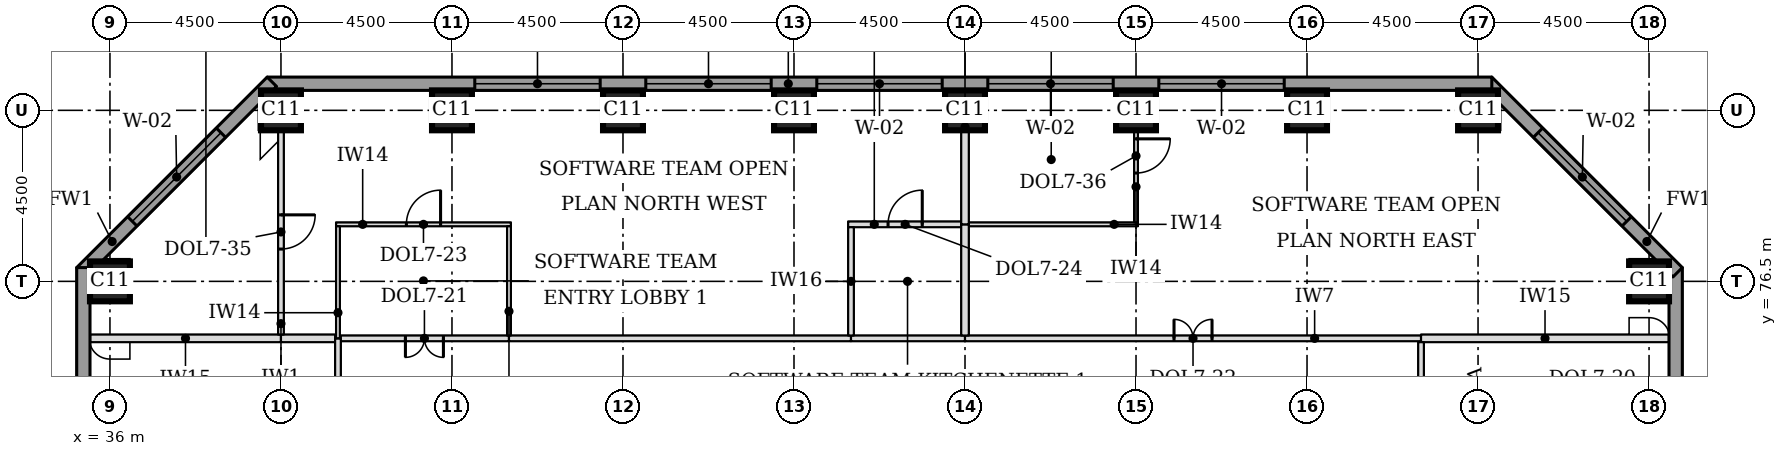
"""IFC4 building model, lengths in metres.
Left out: names, types, materials, properties, quantities, classifications, styles, units other than length and angle.
Written with IfcOpenShell. Run it as: python <this file> out.ifc"""

import sys

from ifc_helpers import new_model, si_unit, direction, frame, frame_2d, origin, origin_2d, place, context, subcontext, project, spatial, rectangle, extrude, element, fill, save


model = new_model("IFC4")
c1 = context("Model", 3, precision=1e-05, world=origin(), true_north=direction((0.0, 1.0)))
c2 = subcontext(c1, "Body", "Model", "MODEL_VIEW")
j1 = project(units=[si_unit("LENGTHUNIT", "METRE"), si_unit("PLANEANGLEUNIT", "RADIAN")], contexts=[c1])
p1 = place(None, origin())
s1 = spatial("IfcSite", under=j1, at=p1, CompositionType="ELEMENT")
p2 = place(p1, origin())
s2 = spatial("IfcBuilding", under=s1, at=p2, CompositionType="ELEMENT")
p3 = place(p2, frame((0.0, 0.0, 130.7)))
s3 = spatial("IfcBuildingStorey", under=s2, at=p3, CompositionType="ELEMENT", Elevation=130.7)
for number, where, z_axis, x_axis in (
    (1, (36.0, 76.5, 0.0), (0.0, 0.0, 1.0), (1.0, 0.0, 0.0)),
    (2, (76.5, 76.5, 0.0), (0.0, 0.0, 1.0), (1.0, 0.0, 0.0)),
    (3, (40.5, 81.0, 0.0), (0.0, 0.0, 1.0), (1.0, 0.0, 0.0)),
    (4, (45.0, 81.0, 0.0), (0.0, 0.0, 1.0), (1.0, 0.0, 0.0)),
    (5, (49.5, 81.0, 0.0), (0.0, 0.0, 1.0), (1.0, 0.0, 0.0)),
    (6, (54.0, 81.0, 0.0), (0.0, 0.0, 1.0), (1.0, 0.0, 0.0)),
    (7, (58.5, 81.0, 0.0), (0.0, 0.0, 1.0), (1.0, 0.0, 0.0)),
    (8, (63.0, 81.0, 0.0), (0.0, 0.0, 1.0), (1.0, 0.0, 0.0)),
    (9, (67.5, 81.0, 0.0), (0.0, 0.0, 1.0), (1.0, 0.0, 0.0)),
    (10, (72.0, 81.0, 0.0), (0.0, 0.0, 1.0), (1.0, 0.0, 0.0)),
):
    element("IfcColumn", number, at=place(p3, frame(where, z_axis=z_axis, x_axis=x_axis)), inside=s3, PredefinedType="COLUMN", context=c2, shape_type="SweptSolid", body=[
        extrude(rectangle(XDim=1.05, YDim=1.05, at=origin_2d()), origin(), (0.0, 0.0, 1.0), 3.7),
    ])
p4 = place(p3, frame((77.2, 44.638, 0.0), z_axis=(0.0, 0.0, 1.0), x_axis=(0.0, 1.0, 0.0)))
e11 = element("IfcWall", 11, at=p4, inside=s3, PredefinedType="STANDARD", context=c2, shape_type="SweptSolid", body=[
    extrude(rectangle(XDim=32.225, YDim=0.35, at=frame_2d((16.112, 0.0))), origin(), (0.0, 0.0, 1.0), 3.525),
])
p5 = place(p4, frame((5.462, 0.0, 0.9)))
e12 = element("IfcOpeningElement", 12, at=p5, cuts=e11, PredefinedType="OPENING", context=c2, shape_type="SweptSolid", body=[
    extrude(rectangle(XDim=3.3, YDim=1.9, at=frame_2d((1.65, 0.95))), frame((0.0, 0.185, 0.0), z_axis=(0.0, -1.0, 0.0), x_axis=(1.0, 0.0, 0.0)), (0.0, 0.0, 1.0), 0.37),
])
p6 = place(p4, frame((9.962, 0.0, 0.9)))
e13 = element("IfcOpeningElement", 13, at=p6, cuts=e11, PredefinedType="OPENING", context=c2, shape_type="SweptSolid", body=[
    extrude(rectangle(XDim=3.3, YDim=1.9, at=frame_2d((1.65, 0.95))), frame((0.0, 0.185, 0.0), z_axis=(0.0, -1.0, 0.0), x_axis=(1.0, 0.0, 0.0)), (0.0, 0.0, 1.0), 0.37),
])
p7 = place(p4, frame((14.462, 0.0, 0.9)))
e14 = element("IfcOpeningElement", 14, at=p7, cuts=e11, PredefinedType="OPENING", context=c2, shape_type="SweptSolid", body=[
    extrude(rectangle(XDim=3.3, YDim=1.9, at=frame_2d((1.65, 0.95))), frame((0.0, 0.185, 0.0), z_axis=(0.0, -1.0, 0.0), x_axis=(1.0, 0.0, 0.0)), (0.0, 0.0, 1.0), 0.37),
])
p8 = place(p4, frame((18.962, 0.0, 0.9)))
e15 = element("IfcOpeningElement", 15, at=p8, cuts=e11, PredefinedType="OPENING", context=c2, shape_type="SweptSolid", body=[
    extrude(rectangle(XDim=3.3, YDim=1.9, at=frame_2d((1.65, 0.95))), frame((0.0, 0.185, 0.0), z_axis=(0.0, -1.0, 0.0), x_axis=(1.0, 0.0, 0.0)), (0.0, 0.0, 1.0), 0.37),
])
p9 = place(p4, frame((23.462, 0.0, 0.9)))
e16 = element("IfcOpeningElement", 16, at=p9, cuts=e11, PredefinedType="OPENING", context=c2, shape_type="SweptSolid", body=[
    extrude(rectangle(XDim=3.3, YDim=1.9, at=frame_2d((1.65, 0.95))), frame((0.0, 0.185, 0.0), z_axis=(0.0, -1.0, 0.0), x_axis=(1.0, 0.0, 0.0)), (0.0, 0.0, 1.0), 0.37),
])
p10 = place(p3, frame((77.251, 76.739, 0.0), z_axis=(0.0, 0.0, 1.0), x_axis=(-0.707106781187, 0.707106781187, 0.0)))
e17 = element("IfcWall", 17, at=p10, inside=s3, PredefinedType="STANDARD", context=c2, shape_type="SweptSolid", body=[
    extrude(rectangle(XDim=7.089, YDim=0.35, at=frame_2d((3.544, 0.0))), origin(), (0.0, 0.0, 1.0), 3.525),
])
p11 = place(p10, frame((1.894, 0.0, 0.9)))
e18 = element("IfcOpeningElement", 18, at=p11, cuts=e17, PredefinedType="OPENING", context=c2, shape_type="SweptSolid", body=[
    extrude(rectangle(XDim=3.3, YDim=1.9, at=frame_2d((1.65, 0.95))), frame((0.0, 0.185, 0.0), z_axis=(0.0, -1.0, 0.0), x_axis=(1.0, 0.0, 0.0)), (0.0, 0.0, 1.0), 0.37),
])
p12 = place(p3, frame((72.362, 81.7, 0.0), z_axis=(0.0, 0.0, 1.0), x_axis=(-1.0, 0.0, 0.0)))
e19 = element("IfcWall", 19, at=p12, inside=s3, PredefinedType="STANDARD", context=c2, shape_type="SweptSolid", body=[
    extrude(rectangle(XDim=32.225, YDim=0.35, at=frame_2d((16.112, 0.0))), origin(), (0.0, 0.0, 1.0), 3.525),
])
p13 = place(p12, frame((5.462, 0.0, 0.9)))
e20 = element("IfcOpeningElement", 20, at=p13, cuts=e19, PredefinedType="OPENING", context=c2, shape_type="SweptSolid", body=[
    extrude(rectangle(XDim=3.3, YDim=1.9, at=frame_2d((1.65, 0.95))), frame((0.0, 0.185, 0.0), z_axis=(0.0, -1.0, 0.0), x_axis=(1.0, 0.0, 0.0)), (0.0, 0.0, 1.0), 0.37),
])
p14 = place(p12, frame((9.962, 0.0, 0.9)))
e21 = element("IfcOpeningElement", 21, at=p14, cuts=e19, PredefinedType="OPENING", context=c2, shape_type="SweptSolid", body=[
    extrude(rectangle(XDim=3.3, YDim=1.9, at=frame_2d((1.65, 0.95))), frame((0.0, 0.185, 0.0), z_axis=(0.0, -1.0, 0.0), x_axis=(1.0, 0.0, 0.0)), (0.0, 0.0, 1.0), 0.37),
])
p15 = place(p12, frame((14.462, 0.0, 0.9)))
e22 = element("IfcOpeningElement", 22, at=p15, cuts=e19, PredefinedType="OPENING", context=c2, shape_type="SweptSolid", body=[
    extrude(rectangle(XDim=3.3, YDim=1.9, at=frame_2d((1.65, 0.95))), frame((0.0, 0.185, 0.0), z_axis=(0.0, -1.0, 0.0), x_axis=(1.0, 0.0, 0.0)), (0.0, 0.0, 1.0), 0.37),
])
p16 = place(p12, frame((18.962, 0.0, 0.9)))
e23 = element("IfcOpeningElement", 23, at=p16, cuts=e19, PredefinedType="OPENING", context=c2, shape_type="SweptSolid", body=[
    extrude(rectangle(XDim=3.3, YDim=1.9, at=frame_2d((1.65, 0.95))), frame((0.0, 0.185, 0.0), z_axis=(0.0, -1.0, 0.0), x_axis=(1.0, 0.0, 0.0)), (0.0, 0.0, 1.0), 0.37),
])
p17 = place(p12, frame((23.462, 0.0, 0.9)))
e24 = element("IfcOpeningElement", 24, at=p17, cuts=e19, PredefinedType="OPENING", context=c2, shape_type="SweptSolid", body=[
    extrude(rectangle(XDim=3.3, YDim=1.9, at=frame_2d((1.65, 0.95))), frame((0.0, 0.185, 0.0), z_axis=(0.0, -1.0, 0.0), x_axis=(1.0, 0.0, 0.0)), (0.0, 0.0, 1.0), 0.37),
])
p18 = place(p3, frame((40.261, 81.751, 0.0), z_axis=(0.0, 0.0, 1.0), x_axis=(-0.707106781187, -0.707106781187, 0.0)))
e25 = element("IfcWall", 25, at=p18, inside=s3, PredefinedType="STANDARD", context=c2, shape_type="SweptSolid", body=[
    extrude(rectangle(XDim=7.089, YDim=0.35, at=frame_2d((3.544, 0.0))), origin(), (0.0, 0.0, 1.0), 3.525),
])
p19 = place(p18, frame((1.894, 0.0, 0.9)))
e26 = element("IfcOpeningElement", 26, at=p19, cuts=e25, PredefinedType="OPENING", context=c2, shape_type="SweptSolid", body=[
    extrude(rectangle(XDim=3.3, YDim=1.9, at=frame_2d((1.65, 0.95))), frame((0.0, 0.185, 0.0), z_axis=(0.0, -1.0, 0.0), x_axis=(1.0, 0.0, 0.0)), (0.0, 0.0, 1.0), 0.37),
])
p20 = place(p3, frame((35.3, 76.862, 0.0), z_axis=(0.0, 0.0, 1.0), x_axis=(0.0, -1.0, 0.0)))
e27 = element("IfcWall", 27, at=p20, inside=s3, PredefinedType="STANDARD", context=c2, shape_type="SweptSolid", body=[
    extrude(rectangle(XDim=13.337, YDim=0.35, at=frame_2d((6.669, 0.0))), origin(), (0.0, 0.0, 1.0), 3.525),
])
p21 = place(p20, frame((9.537, 0.0, 0.9)))
e28 = element("IfcOpeningElement", 28, at=p21, cuts=e27, PredefinedType="OPENING", context=c2, shape_type="SweptSolid", body=[
    extrude(rectangle(XDim=3.3, YDim=1.9, at=frame_2d((1.65, 0.95))), frame((0.0, 0.185, 0.0), z_axis=(0.0, -1.0, 0.0), x_axis=(1.0, 0.0, 0.0)), (0.0, 0.0, 1.0), 0.37),
])
p22 = place(p3, frame((35.475, 75.0, 0.0), z_axis=(0.0, 0.0, 1.0), x_axis=(1.0, 0.0, 0.0)))
e29 = element("IfcWall", 29, at=p22, inside=s3, PredefinedType="PARTITIONING", context=c2, shape_type="SweptSolid", body=[
    extrude(rectangle(XDim=5.025, YDim=0.2, at=frame_2d((2.512, 0.0))), origin(), (0.0, 0.0, 1.0), 3.55),
])
p23 = place(p3, frame((40.5, 75.0, 0.0), z_axis=(0.0, 0.0, 1.0), x_axis=(1.0, 0.0, 0.0)))
e30 = element("IfcWall", 30, at=p23, inside=s3, PredefinedType="PARTITIONING", context=c2, shape_type="SweptSolid", body=[
    extrude(rectangle(XDim=1.425, YDim=0.2, at=frame_2d((0.712, 0.0))), origin(), (0.0, 0.0, 1.0), 3.55),
])
p24 = place(p3, frame((42.075, 75.0, 0.0), z_axis=(0.0, 0.0, 1.0), x_axis=(1.0, 0.0, 0.0)))
e31 = element("IfcWall", 31, at=p24, inside=s3, PredefinedType="PARTITIONING", context=c2, shape_type="SweptSolid", body=[
    extrude(rectangle(XDim=4.425, YDim=0.15, at=frame_2d((2.212, 0.0))), origin(), (0.0, 0.0, 1.0), 3.55),
])
p25 = place(p24, frame((1.7, 0.0, 0.0)))
e32 = element("IfcOpeningElement", 32, at=p25, cuts=e31, PredefinedType="OPENING", context=c2, shape_type="SweptSolid", body=[
    extrude(rectangle(XDim=1.0, YDim=2.1, at=frame_2d((0.5, 1.05))), frame((0.0, 0.085, 0.0), z_axis=(0.0, -1.0, 0.0), x_axis=(1.0, 0.0, 0.0)), (0.0, 0.0, 1.0), 0.17),
])
p26 = place(p3, frame((46.5, 75.0, 0.0), z_axis=(0.0, 0.0, 1.0), x_axis=(1.0, 0.0, 0.0)))
e33 = element("IfcWall", 33, at=p26, inside=s3, PredefinedType="PARTITIONING", context=c2, shape_type="SweptSolid", body=[
    extrude(rectangle(XDim=9.0, YDim=0.15, at=frame_2d((4.5, 0.0))), origin(), (0.0, 0.0, 1.0), 3.55),
])
p27 = place(p3, frame((55.5, 75.0, 0.0), z_axis=(0.0, 0.0, 1.0), x_axis=(1.0, 0.0, 0.0)))
e34 = element("IfcWall", 34, at=p27, inside=s3, PredefinedType="PARTITIONING", context=c2, shape_type="SweptSolid", body=[
    extrude(rectangle(XDim=3.0, YDim=0.15, at=frame_2d((1.5, 0.0))), origin(), (0.0, 0.0, 1.0), 3.55),
])
p28 = place(p3, frame((58.5, 75.0, 0.0), z_axis=(0.0, 0.0, 1.0), x_axis=(1.0, 0.0, 0.0)))
e35 = element("IfcWall", 35, at=p28, inside=s3, PredefinedType="PARTITIONING", context=c2, shape_type="SweptSolid", body=[
    extrude(rectangle(XDim=12.0, YDim=0.15, at=frame_2d((6.0, 0.0))), origin(), (0.0, 0.0, 1.0), 3.55),
])
p29 = place(p28, frame((5.5, 0.0, 0.0)))
e36 = element("IfcOpeningElement", 36, at=p29, cuts=e35, PredefinedType="OPENING", context=c2, shape_type="SweptSolid", body=[
    extrude(rectangle(XDim=1.0, YDim=2.1, at=frame_2d((0.5, 1.05))), frame((0.0, 0.085, 0.0), z_axis=(0.0, -1.0, 0.0), x_axis=(1.0, 0.0, 0.0)), (0.0, 0.0, 1.0), 0.17),
])
p30 = place(p3, frame((70.5, 75.0, 0.0), z_axis=(0.0, 0.0, 1.0), x_axis=(1.0, 0.0, 0.0)))
e37 = element("IfcWall", 37, at=p30, inside=s3, PredefinedType="PARTITIONING", context=c2, shape_type="SweptSolid", body=[
    extrude(rectangle(XDim=6.525, YDim=0.2, at=frame_2d((3.262, 0.0))), origin(), (0.0, 0.0, 1.0), 3.55),
])
p31 = place(p3, frame((41.95, 78.0, 0.0), z_axis=(0.0, 0.0, 1.0), x_axis=(1.0, 0.0, 0.0)))
e38 = element("IfcWall", 38, at=p31, inside=s3, PredefinedType="PARTITIONING", context=c2, shape_type="SweptSolid", body=[
    extrude(rectangle(XDim=4.6, YDim=0.1, at=frame_2d((2.3, 0.0))), origin(), (0.0, 0.0, 1.0), 3.55),
])
p32 = place(p31, frame((1.85, 0.0, 0.0)))
e39 = element("IfcOpeningElement", 39, at=p32, cuts=e38, PredefinedType="OPENING", context=c2, shape_type="SweptSolid", body=[
    extrude(rectangle(XDim=0.9, YDim=2.1, at=frame_2d((0.45, 1.05))), frame((0.0, 0.06, 0.0), z_axis=(0.0, -1.0, 0.0), x_axis=(1.0, 0.0, 0.0)), (0.0, 0.0, 1.0), 0.12),
])
p33 = place(p3, frame((55.425, 78.0, 0.0), z_axis=(0.0, 0.0, 1.0), x_axis=(1.0, 0.0, 0.0)))
e40 = element("IfcWall", 40, at=p33, inside=s3, PredefinedType="PARTITIONING", context=c2, shape_type="SweptSolid", body=[
    extrude(rectangle(XDim=2.975, YDim=0.15, at=frame_2d((1.487, 0.0))), origin(), (0.0, 0.0, 1.0), 3.55),
])
p34 = place(p33, frame((1.05, 0.0, 0.0)))
e41 = element("IfcOpeningElement", 41, at=p34, cuts=e40, PredefinedType="OPENING", context=c2, shape_type="SweptSolid", body=[
    extrude(rectangle(XDim=0.9, YDim=2.1, at=frame_2d((0.45, 1.05))), frame((0.0, 0.085, 0.0), z_axis=(0.0, -1.0, 0.0), x_axis=(1.0, 0.0, 0.0)), (0.0, 0.0, 1.0), 0.17),
])
p35 = place(p3, frame((58.6, 78.0, 0.0), z_axis=(0.0, 0.0, 1.0), x_axis=(1.0, 0.0, 0.0)))
e42 = element("IfcWall", 42, at=p35, inside=s3, PredefinedType="PARTITIONING", context=c2, shape_type="SweptSolid", body=[
    extrude(rectangle(XDim=4.45, YDim=0.1, at=frame_2d((2.225, 0.0))), origin(), (0.0, 0.0, 1.0), 3.55),
])
p36 = place(p3, frame((42.0, 57.075, 0.0), z_axis=(0.0, 0.0, 1.0), x_axis=(0.0, 1.0, 0.0)))
e43 = element("IfcWall", 43, at=p36, inside=s3, PredefinedType="PARTITIONING", context=c2, shape_type="SweptSolid", body=[
    extrude(rectangle(XDim=17.925, YDim=0.15, at=frame_2d((8.962, 0.0))), origin(), (0.0, 0.0, 1.0), 3.55),
])
p37 = place(p3, frame((70.5, 63.0, 0.0), z_axis=(0.0, 0.0, 1.0), x_axis=(0.0, 1.0, 0.0)))
e44 = element("IfcWall", 44, at=p37, inside=s3, PredefinedType="PARTITIONING", context=c2, shape_type="SweptSolid", body=[
    extrude(rectangle(XDim=11.9, YDim=0.15, at=frame_2d((5.95, 0.0))), origin(), (0.0, 0.0, 1.0), 3.55),
])
p38 = place(p37, frame((5.45, 0.0, 0.0)))
e45 = element("IfcOpeningElement", 45, at=p38, cuts=e44, PredefinedType="OPENING", context=c2, shape_type="SweptSolid", body=[
    extrude(rectangle(XDim=1.0, YDim=2.1, at=frame_2d((0.5, 1.05))), frame((0.0, 0.085, 0.0), z_axis=(0.0, -1.0, 0.0), x_axis=(1.0, 0.0, 0.0)), (0.0, 0.0, 1.0), 0.17),
])
p39 = place(p3, frame((42.0, 75.0, 0.0), z_axis=(0.0, 0.0, 1.0), x_axis=(0.0, 1.0, 0.0)))
e46 = element("IfcWall", 46, at=p39, inside=s3, PredefinedType="PARTITIONING", context=c2, shape_type="SweptSolid", body=[
    extrude(rectangle(XDim=2.95, YDim=0.1, at=frame_2d((1.475, 0.0))), origin(), (0.0, 0.0, 1.0), 3.55),
])
p40 = place(p3, frame((46.5, 75.075, 0.0), z_axis=(0.0, 0.0, 1.0), x_axis=(0.0, 1.0, 0.0)))
e47 = element("IfcWall", 47, at=p40, inside=s3, PredefinedType="PARTITIONING", context=c2, shape_type="SweptSolid", body=[
    extrude(rectangle(XDim=2.875, YDim=0.1, at=frame_2d((1.438, 0.0))), origin(), (0.0, 0.0, 1.0), 3.022),
])
p41 = place(p3, frame((55.5, 75.075, 0.0), z_axis=(0.0, 0.0, 1.0), x_axis=(0.0, 1.0, 0.0)))
e48 = element("IfcWall", 48, at=p41, inside=s3, PredefinedType="PARTITIONING", context=c2, shape_type="SweptSolid", body=[
    extrude(rectangle(XDim=2.85, YDim=0.15, at=frame_2d((1.425, 0.0))), origin(), (0.0, 0.0, 1.0), 3.55),
])
p42 = place(p3, frame((58.5, 75.075, 0.0), z_axis=(0.0, 0.0, 1.0), x_axis=(0.0, 1.0, 0.0)))
e49 = element("IfcWall", 49, at=p42, inside=s3, PredefinedType="PARTITIONING", context=c2, shape_type="SweptSolid", body=[
    extrude(rectangle(XDim=2.925, YDim=0.2, at=frame_2d((1.462, 0.0))), origin(), (0.0, 0.0, 1.0), 3.55),
])
p43 = place(p3, frame((40.5, 75.1, 0.0), z_axis=(0.0, 0.0, 1.0), x_axis=(0.0, 1.0, 0.0)))
e50 = element("IfcWall", 50, at=p43, inside=s3, PredefinedType="PARTITIONING", context=c2, shape_type="SweptSolid", body=[
    extrude(rectangle(XDim=5.375, YDim=0.15, at=frame_2d((2.688, 0.0))), origin(), (0.0, 0.0, 1.0), 3.55),
])
p44 = place(p43, frame((2.25, 0.0, 0.0)))
e51 = element("IfcOpeningElement", 51, at=p44, cuts=e50, PredefinedType="OPENING", context=c2, shape_type="SweptSolid", body=[
    extrude(rectangle(XDim=0.9, YDim=2.1, at=frame_2d((0.45, 1.05))), frame((0.0, 0.085, 0.0), z_axis=(0.0, -1.0, 0.0), x_axis=(1.0, 0.0, 0.0)), (0.0, 0.0, 1.0), 0.17),
])
p45 = place(p3, frame((58.5, 78.0, 0.0), z_axis=(0.0, 0.0, 1.0), x_axis=(0.0, 1.0, 0.0)))
e52 = element("IfcWall", 52, at=p45, inside=s3, PredefinedType="PARTITIONING", context=c2, shape_type="SweptSolid", body=[
    extrude(rectangle(XDim=3.525, YDim=0.2, at=frame_2d((1.762, 0.0))), origin(), (0.0, 0.0, 1.0), 3.55),
])
p46 = place(p3, frame((63.0, 78.05, 0.0), z_axis=(0.0, 0.0, 1.0), x_axis=(0.0, 1.0, 0.0)))
e53 = element("IfcWall", 53, at=p46, inside=s3, PredefinedType="PARTITIONING", context=c2, shape_type="SweptSolid", body=[
    extrude(rectangle(XDim=3.475, YDim=0.1, at=frame_2d((1.737, 0.0))), origin(), (0.0, 0.0, 1.0), 3.55),
])
p47 = place(p46, frame((1.3, 0.0, 0.0)))
e54 = element("IfcOpeningElement", 54, at=p47, cuts=e53, PredefinedType="OPENING", context=c2, shape_type="SweptSolid", body=[
    extrude(rectangle(XDim=0.9, YDim=2.1, at=frame_2d((0.45, 1.05))), frame((0.0, 0.06, 0.0), z_axis=(0.0, -1.0, 0.0), x_axis=(1.0, 0.0, 0.0)), (0.0, 0.0, 1.0), 0.12),
])
p48 = place(p11, origin())
e55 = element("IfcWindow", 55, at=p48, inside=s3, PartitioningType="SINGLE_PANEL", PredefinedType="WINDOW", context=c2, shape_type="SweptSolid", body=[
    extrude(rectangle(XDim=3.3, YDim=1.9, at=frame_2d((1.65, 0.95))), frame((0.0, 0.085, 0.0), z_axis=(0.0, -1.0, 0.0), x_axis=(1.0, 0.0, 0.0)), (0.0, 0.0, 1.0), 0.06),
])
fill(e18, e55)
p49 = place(p13, origin())
e56 = element("IfcWindow", 56, at=p49, inside=s3, PartitioningType="SINGLE_PANEL", PredefinedType="WINDOW", context=c2, shape_type="SweptSolid", body=[
    extrude(rectangle(XDim=3.3, YDim=1.9, at=frame_2d((1.65, 0.95))), frame((0.0, 0.085, 0.0), z_axis=(0.0, -1.0, 0.0), x_axis=(1.0, 0.0, 0.0)), (0.0, 0.0, 1.0), 0.06),
])
fill(e20, e56)
p50 = place(p14, origin())
e57 = element("IfcWindow", 57, at=p50, inside=s3, PartitioningType="SINGLE_PANEL", PredefinedType="WINDOW", context=c2, shape_type="SweptSolid", body=[
    extrude(rectangle(XDim=3.3, YDim=1.9, at=frame_2d((1.65, 0.95))), frame((0.0, 0.085, 0.0), z_axis=(0.0, -1.0, 0.0), x_axis=(1.0, 0.0, 0.0)), (0.0, 0.0, 1.0), 0.06),
])
fill(e21, e57)
p51 = place(p15, origin())
e58 = element("IfcWindow", 58, at=p51, inside=s3, PartitioningType="SINGLE_PANEL", PredefinedType="WINDOW", context=c2, shape_type="SweptSolid", body=[
    extrude(rectangle(XDim=3.3, YDim=1.9, at=frame_2d((1.65, 0.95))), frame((0.0, 0.085, 0.0), z_axis=(0.0, -1.0, 0.0), x_axis=(1.0, 0.0, 0.0)), (0.0, 0.0, 1.0), 0.06),
])
fill(e22, e58)
p52 = place(p16, origin())
e59 = element("IfcWindow", 59, at=p52, inside=s3, PartitioningType="SINGLE_PANEL", PredefinedType="WINDOW", context=c2, shape_type="SweptSolid", body=[
    extrude(rectangle(XDim=3.3, YDim=1.9, at=frame_2d((1.65, 0.95))), frame((0.0, 0.085, 0.0), z_axis=(0.0, -1.0, 0.0), x_axis=(1.0, 0.0, 0.0)), (0.0, 0.0, 1.0), 0.06),
])
fill(e23, e59)
p53 = place(p17, origin())
e60 = element("IfcWindow", 60, at=p53, inside=s3, PartitioningType="SINGLE_PANEL", PredefinedType="WINDOW", context=c2, shape_type="SweptSolid", body=[
    extrude(rectangle(XDim=3.3, YDim=1.9, at=frame_2d((1.65, 0.95))), frame((0.0, 0.085, 0.0), z_axis=(0.0, -1.0, 0.0), x_axis=(1.0, 0.0, 0.0)), (0.0, 0.0, 1.0), 0.06),
])
fill(e24, e60)
p54 = place(p19, origin())
e61 = element("IfcWindow", 61, at=p54, inside=s3, PartitioningType="SINGLE_PANEL", PredefinedType="WINDOW", context=c2, shape_type="SweptSolid", body=[
    extrude(rectangle(XDim=3.3, YDim=1.9, at=frame_2d((1.65, 0.95))), frame((0.0, 0.085, 0.0), z_axis=(0.0, -1.0, 0.0), x_axis=(1.0, 0.0, 0.0)), (0.0, 0.0, 1.0), 0.06),
])
fill(e26, e61)
p55 = place(p25, frame((1.0, 0.0, 0.0), z_axis=(0.0, 0.0, 1.0), x_axis=(-1.0, 0.0, 0.0)))
e62 = element("IfcDoor", 62, at=p55, inside=s3, OperationType="DOUBLE_DOOR_SINGLE_SWING", PredefinedType="DOOR", context=c2, shape_type="SweptSolid", body=[
    extrude(rectangle(XDim=1.0, YDim=2.1, at=frame_2d((0.5, 1.05))), frame((0.0, 0.025, 0.0), z_axis=(0.0, -1.0, 0.0), x_axis=(1.0, 0.0, 0.0)), (0.0, 0.0, 1.0), 0.05),
])
fill(e32, e62)
p56 = place(p32, origin())
e63 = element("IfcDoor", 63, at=p56, inside=s3, OperationType="SINGLE_SWING_RIGHT", PredefinedType="DOOR", context=c2, shape_type="SweptSolid", body=[
    extrude(rectangle(XDim=0.9, YDim=2.1, at=frame_2d((0.45, 1.05))), frame((0.0, 0.025, 0.0), z_axis=(0.0, -1.0, 0.0), x_axis=(1.0, 0.0, 0.0)), (0.0, 0.0, 1.0), 0.05),
])
fill(e39, e63)
p57 = place(p34, origin())
e64 = element("IfcDoor", 64, at=p57, inside=s3, OperationType="SINGLE_SWING_RIGHT", PredefinedType="DOOR", context=c2, shape_type="SweptSolid", body=[
    extrude(rectangle(XDim=0.9, YDim=2.1, at=frame_2d((0.45, 1.05))), frame((0.0, 0.025, 0.0), z_axis=(0.0, -1.0, 0.0), x_axis=(1.0, 0.0, 0.0)), (0.0, 0.0, 1.0), 0.05),
])
fill(e41, e64)
p58 = place(p44, frame((0.9, 0.0, 0.0), z_axis=(0.0, 0.0, 1.0), x_axis=(-1.0, 0.0, 0.0)))
e65 = element("IfcDoor", 65, at=p58, inside=s3, OperationType="SINGLE_SWING_LEFT", PredefinedType="DOOR", context=c2, shape_type="SweptSolid", body=[
    extrude(rectangle(XDim=0.9, YDim=2.1, at=frame_2d((0.45, 1.05))), frame((0.0, 0.025, 0.0), z_axis=(0.0, -1.0, 0.0), x_axis=(1.0, 0.0, 0.0)), (0.0, 0.0, 1.0), 0.05),
])
fill(e51, e65)
p59 = place(p29, origin())
e66 = element("IfcDoor", 66, at=p59, inside=s3, OperationType="DOUBLE_DOOR_SINGLE_SWING", PredefinedType="DOOR", context=c2, shape_type="SweptSolid", body=[
    extrude(rectangle(XDim=1.0, YDim=2.1, at=frame_2d((0.5, 1.05))), frame((0.0, 0.025, 0.0), z_axis=(0.0, -1.0, 0.0), x_axis=(1.0, 0.0, 0.0)), (0.0, 0.0, 1.0), 0.05),
])
fill(e36, e66)
p60 = place(p47, frame((0.9, 0.0, 0.0), z_axis=(0.0, 0.0, 1.0), x_axis=(-1.0, 0.0, 0.0)))
e67 = element("IfcDoor", 67, at=p60, inside=s3, OperationType="SINGLE_SWING_LEFT", PredefinedType="DOOR", context=c2, shape_type="SweptSolid", body=[
    extrude(rectangle(XDim=0.9, YDim=2.1, at=frame_2d((0.45, 1.05))), frame((0.0, 0.025, 0.0), z_axis=(0.0, -1.0, 0.0), x_axis=(1.0, 0.0, 0.0)), (0.0, 0.0, 1.0), 0.05),
])
fill(e54, e67)
save(model, sys.argv[1])
